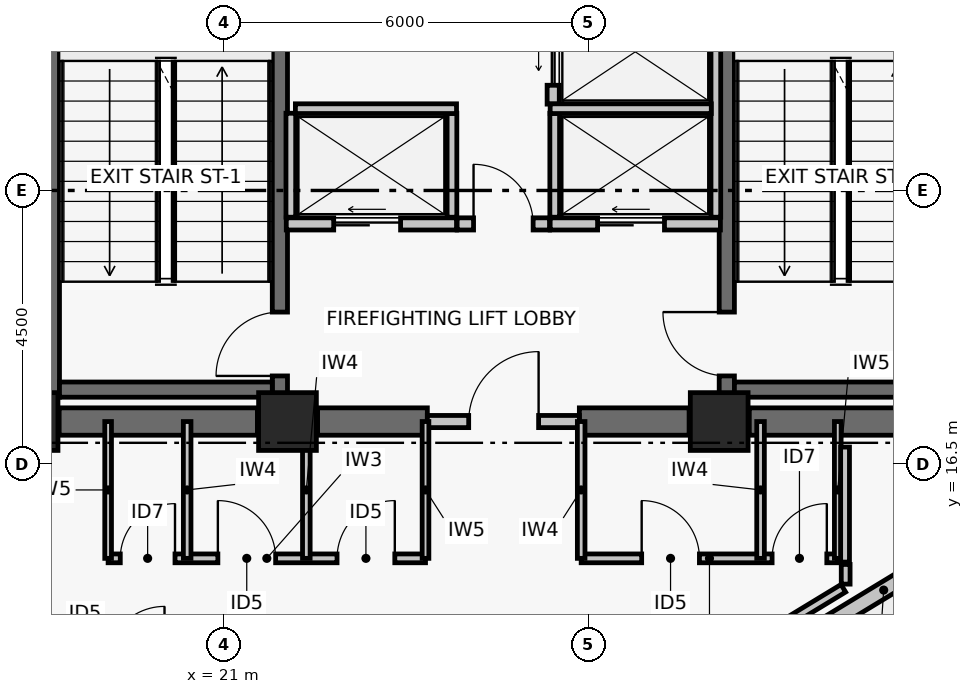
"""IFC4 building model, lengths in metres.
Left out: names, types, materials, properties, quantities, classifications, styles, units other than length and angle.
Written with IfcOpenShell. Run it as: python <this file> out.ifc"""

import sys

from ifc_helpers import new_model, si_unit, direction, frame, frame_2d, origin, origin_2d, place, context, subcontext, project, spatial, rectangle, extrude, element, fill, save


model = new_model("IFC4")
c1 = context("Model", 3, precision=1e-05, world=origin(), true_north=direction((0.0, 1.0)))
c2 = subcontext(c1, "Body", "Model", "MODEL_VIEW")
j1 = project(units=[si_unit("LENGTHUNIT", "METRE"), si_unit("PLANEANGLEUNIT", "RADIAN")], contexts=[c1])
p1 = place(None, origin())
s1 = spatial("IfcSite", under=j1, at=p1, CompositionType="ELEMENT")
p2 = place(p1, origin())
s2 = spatial("IfcBuilding", under=s1, at=p2, CompositionType="ELEMENT")
p3 = place(p2, frame((0.0, 0.0, 247.14)))
s3 = spatial("IfcBuildingStorey", under=s2, at=p3, CompositionType="ELEMENT", Elevation=247.14)
for number, where, z_axis, x_axis in (
    (1, (17.8, 17.2, 0.0), (0.0, 0.0, 1.0), (1.0, 0.0, 0.0)),
    (2, (22.05, 17.2, 0.0), (0.0, 0.0, 1.0), (1.0, 0.0, 0.0)),
    (3, (29.15, 17.2, 0.0), (0.0, 0.0, 1.0), (1.0, 0.0, 0.0)),
):
    element("IfcColumn", number, at=place(p3, frame(where, z_axis=z_axis, x_axis=x_axis)), inside=s3, PredefinedType="COLUMN", context=c2, shape_type="SweptSolid", body=[
        extrude(rectangle(XDim=0.95, YDim=0.95, at=origin_2d()), origin(), (0.0, 0.0, 1.0), 3.72),
    ])
p4 = place(p3, frame((18.295, 17.2, 0.0), z_axis=(0.0, 0.0, 1.0), x_axis=(1.0, 0.0, 0.0)))
e4 = element("IfcWall", 4, at=p4, inside=s3, PredefinedType="SHEAR", context=c2, shape_type="SweptSolid", body=[
    extrude(rectangle(XDim=3.26, YDim=0.45, at=frame_2d((1.63, 0.0))), origin(), (0.0, 0.0, 1.0), 3.5),
])
p5 = place(p3, frame((22.545, 17.2, 0.0), z_axis=(0.0, 0.0, 1.0), x_axis=(1.0, 0.0, 0.0)))
e5 = element("IfcWall", 5, at=p5, inside=s3, PredefinedType="SHEAR", context=c2, shape_type="SweptSolid", body=[
    extrude(rectangle(XDim=1.805, YDim=0.45, at=frame_2d((0.903, 0.0))), origin(), (0.0, 0.0, 1.0), 3.5),
])
p6 = place(p3, frame((26.85, 17.2, 0.0), z_axis=(0.0, 0.0, 1.0), x_axis=(1.0, 0.0, 0.0)))
e6 = element("IfcWall", 6, at=p6, inside=s3, PredefinedType="SHEAR", context=c2, shape_type="SweptSolid", body=[
    extrude(rectangle(XDim=1.805, YDim=0.45, at=frame_2d((0.902, 0.0))), origin(), (0.0, 0.0, 1.0), 3.5),
])
p7 = place(p3, frame((29.645, 17.2, 0.0), z_axis=(0.0, 0.0, 1.0), x_axis=(1.0, 0.0, 0.0)))
e7 = element("IfcWall", 7, at=p7, inside=s3, PredefinedType="SHEAR", context=c2, shape_type="SweptSolid", body=[
    extrude(rectangle(XDim=3.26, YDim=0.45, at=frame_2d((1.63, 0.0))), origin(), (0.0, 0.0, 1.0), 3.5),
])
p8 = place(p3, frame((18.175, 17.6, 0.0), z_axis=(0.0, 0.0, 1.0), x_axis=(0.0, 1.0, 0.0)))
e8 = element("IfcWall", 8, at=p8, inside=s3, PredefinedType="SHEAR", context=c2, shape_type="SweptSolid", body=[
    extrude(rectangle(XDim=8.8, YDim=0.25, at=frame_2d((4.4, 0.0))), origin(), (0.0, 0.0, 1.0), 3.5),
])
p9 = place(p3, frame((21.925, 17.6, 0.0), z_axis=(0.0, 0.0, 1.0), x_axis=(0.0, 1.0, 0.0)))
e9 = element("IfcWall", 9, at=p9, inside=s3, PredefinedType="SHEAR", context=c2, shape_type="SweptSolid", body=[
    extrude(rectangle(XDim=8.8, YDim=0.25, at=frame_2d((4.4, 0.0))), origin(), (0.0, 0.0, 1.0), 3.5),
])
p10 = place(p9, frame((0.35, 0.0, 0.0)))
e10 = element("IfcOpeningElement", 10, at=p10, cuts=e9, PredefinedType="OPENING", context=c2, shape_type="SweptSolid", body=[
    extrude(rectangle(XDim=1.05, YDim=2.08, at=frame_2d((0.525, 1.04))), frame((0.0, 0.135, 0.0), z_axis=(0.0, -1.0, 0.0), x_axis=(1.0, 0.0, 0.0)), (0.0, 0.0, 1.0), 0.27),
])
p11 = place(p3, frame((18.3, 17.725, 0.0), z_axis=(0.0, 0.0, 1.0), x_axis=(1.0, 0.0, 0.0)))
e11 = element("IfcWall", 11, at=p11, inside=s3, PredefinedType="SHEAR", context=c2, shape_type="SweptSolid", body=[
    extrude(rectangle(XDim=3.5, YDim=0.25, at=frame_2d((1.75, 0.0))), origin(), (0.0, 0.0, 1.0), 3.5),
])
p12 = place(p3, frame((29.275, 17.6, 0.0), z_axis=(0.0, 0.0, 1.0), x_axis=(0.0, 1.0, 0.0)))
e12 = element("IfcWall", 12, at=p12, inside=s3, PredefinedType="SHEAR", context=c2, shape_type="SweptSolid", body=[
    extrude(rectangle(XDim=8.8, YDim=0.25, at=frame_2d((4.4, 0.0))), origin(), (0.0, 0.0, 1.0), 3.5),
])
p13 = place(p12, frame((0.35, 0.0, 0.0)))
e13 = element("IfcOpeningElement", 13, at=p13, cuts=e12, PredefinedType="OPENING", context=c2, shape_type="SweptSolid", body=[
    extrude(rectangle(XDim=1.05, YDim=2.08, at=frame_2d((0.525, 1.04))), frame((0.0, 0.135, 0.0), z_axis=(0.0, -1.0, 0.0), x_axis=(1.0, 0.0, 0.0)), (0.0, 0.0, 1.0), 0.27),
])
p14 = place(p3, frame((29.4, 17.725, 0.0), z_axis=(0.0, 0.0, 1.0), x_axis=(1.0, 0.0, 0.0)))
e14 = element("IfcWall", 14, at=p14, inside=s3, PredefinedType="SHEAR", context=c2, shape_type="SweptSolid", body=[
    extrude(rectangle(XDim=3.5, YDim=0.25, at=frame_2d((1.75, 0.0))), origin(), (0.0, 0.0, 1.0), 3.5),
])
p15 = place(p3, frame((34.474, 16.019, 0.0), z_axis=(0.0, 0.0, 1.0), x_axis=(-0.854667549998, -0.519175672563, 0.0)))
e15 = element("IfcWall", 15, at=p15, inside=s3, PredefinedType="PARTITIONING", context=c2, shape_type="SweptSolid", body=[
    extrude(rectangle(XDim=6.127, YDim=0.26, at=frame_2d((3.063, 0.0))), origin(), (0.0, 0.0, 1.0), 3.5),
])
p16 = place(p3, frame((24.35, 17.2, 0.0), z_axis=(0.0, 0.0, 1.0), x_axis=(1.0, 0.0, 0.0)))
e16 = element("IfcWall", 16, at=p16, inside=s3, PredefinedType="PARTITIONING", context=c2, shape_type="SweptSolid", body=[
    extrude(rectangle(XDim=2.5, YDim=0.2, at=frame_2d((1.25, 0.0))), origin(), (0.0, 0.0, 1.0), 2.63),
])
p17 = place(p16, frame((0.68, 0.0, 0.0)))
e17 = element("IfcOpeningElement", 17, at=p17, cuts=e16, PredefinedType="OPENING", context=c2, shape_type="SweptSolid", body=[
    extrude(rectangle(XDim=1.15, YDim=2.08, at=frame_2d((0.575, 1.04))), frame((0.0, 0.11, 0.0), z_axis=(0.0, -1.0, 0.0), x_axis=(1.0, 0.0, 0.0)), (0.0, 0.0, 1.0), 0.22),
])
p18 = place(p3, frame((24.84, 20.45, 0.0), z_axis=(0.0, 0.0, 1.0), x_axis=(1.0, 0.0, 0.0)))
e18 = element("IfcWall", 18, at=p18, inside=s3, PredefinedType="PARTITIONING", context=c2, shape_type="SweptSolid", body=[
    extrude(rectangle(XDim=1.52, YDim=0.2, at=frame_2d((0.76, 0.0))), origin(), (0.0, 0.0, 1.0), 3.5),
])
p19 = place(p18, frame((0.27, 0.0, 0.0)))
e19 = element("IfcOpeningElement", 19, at=p19, cuts=e18, PredefinedType="OPENING", context=c2, shape_type="SweptSolid", body=[
    extrude(rectangle(XDim=0.98, YDim=2.06, at=frame_2d((0.49, 1.03))), frame((0.0, 0.11, 0.0), z_axis=(0.0, -1.0, 0.0), x_axis=(1.0, 0.0, 0.0)), (0.0, 0.0, 1.0), 0.22),
])
p20 = place(p3, frame((22.03, 20.45, 0.0), z_axis=(0.0, 0.0, 1.0), x_axis=(1.0, 0.0, 0.0)))
e20 = element("IfcWall", 20, at=p20, inside=s3, PredefinedType="PARTITIONING", context=c2, shape_type="SweptSolid", body=[
    extrude(rectangle(XDim=2.8, YDim=0.2, at=frame_2d((1.4, 0.0))), origin(), (0.0, 0.0, 1.0), 3.5),
])
p21 = place(p20, frame((0.78, 0.0, 0.0)))
e21 = element("IfcOpeningElement", 21, at=p21, cuts=e20, PredefinedType="OPENING", context=c2, shape_type="SweptSolid", body=[
    extrude(rectangle(XDim=1.1, YDim=2.08, at=frame_2d((0.55, 1.04))), frame((0.0, 0.11, 0.0), z_axis=(0.0, -1.0, 0.0), x_axis=(1.0, 0.0, 0.0)), (0.0, 0.0, 1.0), 0.22),
])
p22 = place(p3, frame((26.37, 20.45, 0.0), z_axis=(0.0, 0.0, 1.0), x_axis=(1.0, 0.0, 0.0)))
e22 = element("IfcWall", 22, at=p22, inside=s3, PredefinedType="PARTITIONING", context=c2, shape_type="SweptSolid", body=[
    extrude(rectangle(XDim=2.8, YDim=0.2, at=frame_2d((1.4, 0.0))), origin(), (0.0, 0.0, 1.0), 3.5),
])
p23 = place(p22, frame((0.78, 0.0, 0.0)))
e23 = element("IfcOpeningElement", 23, at=p23, cuts=e22, PredefinedType="OPENING", context=c2, shape_type="SweptSolid", body=[
    extrude(rectangle(XDim=1.1, YDim=2.08, at=frame_2d((0.55, 1.04))), frame((0.0, 0.11, 0.0), z_axis=(0.0, -1.0, 0.0), x_axis=(1.0, 0.0, 0.0)), (0.0, 0.0, 1.0), 0.22),
])
p24 = place(p3, frame((26.42, 22.42, 0.0), z_axis=(0.0, 0.0, 1.0), x_axis=(0.0, 1.0, 0.0)))
e24 = element("IfcWall", 24, at=p24, inside=s3, PredefinedType="PARTITIONING", context=c2, shape_type="SweptSolid", body=[
    extrude(rectangle(XDim=1.72, YDim=0.2, at=frame_2d((0.86, 0.0))), origin(), (0.0, 0.0, 1.0), 3.5),
])
p25 = place(p24, frame((0.31, 0.0, 0.0)))
e25 = element("IfcOpeningElement", 25, at=p25, cuts=e24, PredefinedType="OPENING", context=c2, shape_type="SweptSolid", body=[
    extrude(rectangle(XDim=1.1, YDim=2.08, at=frame_2d((0.55, 1.04))), frame((0.0, 0.11, 0.0), z_axis=(0.0, -1.0, 0.0), x_axis=(1.0, 0.0, 0.0)), (0.0, 0.0, 1.0), 0.22),
])
for number, where, z_axis, x_axis in (
    (26, (22.105, 20.56, 0.0), (0.0, 0.0, 1.0), (0.0, 1.0, 0.0)),
    (27, (24.755, 20.56, 0.0), (0.0, 0.0, 1.0), (0.0, 1.0, 0.0)),
):
    element("IfcWall", number, at=place(p3, frame(where, z_axis=z_axis, x_axis=x_axis)), inside=s3, PredefinedType="PARTITIONING", context=c2, shape_type="SweptSolid", body=[
        extrude(rectangle(XDim=1.71, YDim=0.16, at=frame_2d((0.855, 0.0))), origin(), (0.0, 0.0, 1.0), 3.5),
    ])
p26 = place(p3, frame((22.18, 22.345, 0.0), z_axis=(0.0, 0.0, 1.0), x_axis=(1.0, 0.0, 0.0)))
e28 = element("IfcWall", 28, at=p26, inside=s3, PredefinedType="PARTITIONING", context=c2, shape_type="SweptSolid", body=[
    extrude(rectangle(XDim=2.65, YDim=0.16, at=frame_2d((1.325, 0.0))), origin(), (0.0, 0.0, 1.0), 3.5),
])
p27 = place(p3, frame((29.095, 20.56, 0.0), z_axis=(0.0, 0.0, 1.0), x_axis=(0.0, 1.0, 0.0)))
e29 = element("IfcWall", 29, at=p27, inside=s3, PredefinedType="PARTITIONING", context=c2, shape_type="SweptSolid", body=[
    extrude(rectangle(XDim=3.58, YDim=0.16, at=frame_2d((1.79, 0.0))), origin(), (0.0, 0.0, 1.0), 3.5),
])
p28 = place(p3, frame((26.445, 20.56, 0.0), z_axis=(0.0, 0.0, 1.0), x_axis=(0.0, 1.0, 0.0)))
e30 = element("IfcWall", 30, at=p28, inside=s3, PredefinedType="PARTITIONING", context=c2, shape_type="SweptSolid", body=[
    extrude(rectangle(XDim=1.71, YDim=0.16, at=frame_2d((0.855, 0.0))), origin(), (0.0, 0.0, 1.0), 3.5),
])
p29 = place(p3, frame((26.37, 22.345, 0.0), z_axis=(0.0, 0.0, 1.0), x_axis=(1.0, 0.0, 0.0)))
e31 = element("IfcWall", 31, at=p29, inside=s3, PredefinedType="PARTITIONING", context=c2, shape_type="SweptSolid", body=[
    extrude(rectangle(XDim=2.65, YDim=0.16, at=frame_2d((1.325, 0.0))), origin(), (0.0, 0.0, 1.0), 3.5),
])
p30 = place(p3, frame((19.1, 14.95, 0.0), z_axis=(0.0, 0.0, 1.0), x_axis=(1.0, 0.0, 0.0)))
e32 = element("IfcWall", 32, at=p30, inside=s3, PredefinedType="PARTITIONING", context=c2, shape_type="SweptSolid", body=[
    extrude(rectangle(XDim=5.22, YDim=0.145, at=frame_2d((2.61, 0.0))), origin(), (0.0, 0.0, 1.0), 2.78),
])
p31 = place(p30, frame((0.2, 0.0, 0.0)))
e33 = element("IfcOpeningElement", 33, at=p31, cuts=e32, PredefinedType="OPENING", context=c2, shape_type="SweptSolid", body=[
    extrude(rectangle(XDim=0.9, YDim=2.02, at=frame_2d((0.45, 1.01))), frame((0.0, 0.083, 0.0), z_axis=(0.0, -1.0, 0.0), x_axis=(1.0, 0.0, 0.0)), (0.0, 0.0, 1.0), 0.165),
])
p32 = place(p30, frame((1.805, 0.0, 0.0)))
e34 = element("IfcOpeningElement", 34, at=p32, cuts=e32, PredefinedType="OPENING", context=c2, shape_type="SweptSolid", body=[
    extrude(rectangle(XDim=0.95, YDim=2.06, at=frame_2d((0.475, 1.03))), frame((0.0, 0.083, 0.0), z_axis=(0.0, -1.0, 0.0), x_axis=(1.0, 0.0, 0.0)), (0.0, 0.0, 1.0), 0.165),
])
p33 = place(p30, frame((3.765, 0.0, 0.0)))
e35 = element("IfcOpeningElement", 35, at=p33, cuts=e32, PredefinedType="OPENING", context=c2, shape_type="SweptSolid", body=[
    extrude(rectangle(XDim=0.95, YDim=2.06, at=frame_2d((0.475, 1.03))), frame((0.0, 0.083, 0.0), z_axis=(0.0, -1.0, 0.0), x_axis=(1.0, 0.0, 0.0)), (0.0, 0.0, 1.0), 0.165),
])
p34 = place(p3, frame((26.88, 14.95, 0.0), z_axis=(0.0, 0.0, 1.0), x_axis=(1.0, 0.0, 0.0)))
e36 = element("IfcWall", 36, at=p34, inside=s3, PredefinedType="PARTITIONING", context=c2, shape_type="SweptSolid", body=[
    extrude(rectangle(XDim=4.22, YDim=0.145, at=frame_2d((2.11, 0.0))), origin(), (0.0, 0.0, 1.0), 2.98),
])
p35 = place(p34, frame((0.995, 0.0, 0.0)))
e37 = element("IfcOpeningElement", 37, at=p35, cuts=e36, PredefinedType="OPENING", context=c2, shape_type="SweptSolid", body=[
    extrude(rectangle(XDim=0.95, YDim=2.06, at=frame_2d((0.475, 1.03))), frame((0.0, 0.083, 0.0), z_axis=(0.0, -1.0, 0.0), x_axis=(1.0, 0.0, 0.0)), (0.0, 0.0, 1.0), 0.165),
])
p36 = place(p34, frame((3.14, 0.0, 0.0)))
e38 = element("IfcOpeningElement", 38, at=p36, cuts=e36, PredefinedType="OPENING", context=c2, shape_type="SweptSolid", body=[
    extrude(rectangle(XDim=0.9, YDim=2.02, at=frame_2d((0.45, 1.01))), frame((0.0, 0.083, 0.0), z_axis=(0.0, -1.0, 0.0), x_axis=(1.0, 0.0, 0.0)), (0.0, 0.0, 1.0), 0.165),
])
p37 = place(p3, frame((19.1, 14.95, 0.0), z_axis=(0.0, 0.0, 1.0), x_axis=(0.0, 1.0, 0.0)))
e39 = element("IfcWall", 39, at=p37, inside=s3, PredefinedType="PARTITIONING", context=c2, shape_type="SweptSolid", body=[
    extrude(rectangle(XDim=2.25, YDim=0.11, at=frame_2d((1.125, 0.0))), origin(), (0.0, 0.0, 1.0), 2.63),
])
for number, where, z_axis, x_axis in (
    (40, (20.4, 14.95, 0.0), (0.0, 0.0, 1.0), (0.0, 1.0, 0.0)),
    (41, (22.36, 14.95, 0.0), (0.0, 0.0, 1.0), (0.0, 1.0, 0.0)),
):
    element("IfcWall", number, at=place(p3, frame(where, z_axis=z_axis, x_axis=x_axis)), inside=s3, PredefinedType="PARTITIONING", context=c2, shape_type="SweptSolid", body=[
        extrude(rectangle(XDim=2.25, YDim=0.125, at=frame_2d((1.125, 0.0))), origin(), (0.0, 0.0, 1.0), 2.63),
    ])
p38 = place(p3, frame((24.32, 14.95, 0.0), z_axis=(0.0, 0.0, 1.0), x_axis=(0.0, 1.0, 0.0)))
e42 = element("IfcWall", 42, at=p38, inside=s3, PredefinedType="PARTITIONING", context=c2, shape_type="SweptSolid", body=[
    extrude(rectangle(XDim=2.25, YDim=0.11, at=frame_2d((1.125, 0.0))), origin(), (0.0, 0.0, 1.0), 2.63),
])
for number, where, z_axis, x_axis in (
    (43, (26.88, 14.95, 0.0), (0.0, 0.0, 1.0), (0.0, 1.0, 0.0)),
    (44, (29.83, 14.95, 0.0), (0.0, 0.0, 1.0), (0.0, 1.0, 0.0)),
):
    element("IfcWall", number, at=place(p3, frame(where, z_axis=z_axis, x_axis=x_axis)), inside=s3, PredefinedType="PARTITIONING", context=c2, shape_type="SweptSolid", body=[
        extrude(rectangle(XDim=2.25, YDim=0.125, at=frame_2d((1.125, 0.0))), origin(), (0.0, 0.0, 1.0), 2.63),
    ])
p39 = place(p3, frame((31.1, 14.95, 0.0), z_axis=(0.0, 0.0, 1.0), x_axis=(0.0, 1.0, 0.0)))
e45 = element("IfcWall", 45, at=p39, inside=s3, PredefinedType="PARTITIONING", context=c2, shape_type="SweptSolid", body=[
    extrude(rectangle(XDim=2.25, YDim=0.11, at=frame_2d((1.125, 0.0))), origin(), (0.0, 0.0, 1.0), 2.63),
])
p40 = place(p3, frame((29.168, 13.229, 0.0), z_axis=(0.0, 0.0, 1.0), x_axis=(0.854678044033, 0.519158396876, 0.0)))
e46 = element("IfcWall", 46, at=p40, inside=s3, PredefinedType="PARTITIONING", context=c2, shape_type="SweptSolid", body=[
    extrude(rectangle(XDim=2.368, YDim=0.145, at=frame_2d((1.184, 0.0))), origin(), (0.0, 0.0, 1.0), 3.5),
])
p41 = place(p3, frame((31.23, 14.526, 0.0), z_axis=(0.0, 0.0, 1.0), x_axis=(0.0, 1.0, 0.0)))
e47 = element("IfcWall", 47, at=p41, inside=s3, PredefinedType="PARTITIONING", context=c2, shape_type="SweptSolid", body=[
    extrude(rectangle(XDim=0.324, YDim=0.145, at=frame_2d((0.162, 0.0))), origin(), (0.0, 0.0, 1.0), 3.5),
])
p42 = place(p3, frame((31.22, 14.889, 0.0), z_axis=(0.0, 0.0, 1.0), x_axis=(0.0, 1.0, 0.0)))
e48 = element("IfcWall", 48, at=p42, inside=s3, PredefinedType="PARTITIONING", context=c2, shape_type="SweptSolid", body=[
    extrude(rectangle(XDim=1.891, YDim=0.145, at=frame_2d((0.946, 0.0))), origin(), (0.0, 0.0, 1.0), 2.63),
])
p43 = place(p10, origin())
e49 = element("IfcDoor", 49, at=p43, inside=s3, OperationType="SINGLE_SWING_LEFT", PredefinedType="DOOR", context=c2, shape_type="SweptSolid", body=[
    extrude(rectangle(XDim=1.05, YDim=2.08, at=frame_2d((0.525, 1.04))), frame((0.0, 0.025, 0.0), z_axis=(0.0, -1.0, 0.0), x_axis=(1.0, 0.0, 0.0)), (0.0, 0.0, 1.0), 0.05),
])
fill(e10, e49)
p44 = place(p13, origin())
e50 = element("IfcDoor", 50, at=p44, inside=s3, OperationType="SINGLE_SWING_RIGHT", PredefinedType="DOOR", context=c2, shape_type="SweptSolid", body=[
    extrude(rectangle(XDim=1.05, YDim=2.08, at=frame_2d((0.525, 1.04))), frame((0.0, 0.025, 0.0), z_axis=(0.0, -1.0, 0.0), x_axis=(1.0, 0.0, 0.0)), (0.0, 0.0, 1.0), 0.05),
])
fill(e13, e50)
p45 = place(p17, origin())
e51 = element("IfcDoor", 51, at=p45, inside=s3, OperationType="SINGLE_SWING_RIGHT", PredefinedType="DOOR", context=c2, shape_type="SweptSolid", body=[
    extrude(rectangle(XDim=1.15, YDim=2.08, at=frame_2d((0.575, 1.04))), frame((0.0, 0.025, 0.0), z_axis=(0.0, -1.0, 0.0), x_axis=(1.0, 0.0, 0.0)), (0.0, 0.0, 1.0), 0.05),
])
fill(e17, e51)
p46 = place(p19, origin())
e52 = element("IfcDoor", 52, at=p46, inside=s3, OperationType="SINGLE_SWING_LEFT", PredefinedType="DOOR", context=c2, shape_type="SweptSolid", body=[
    extrude(rectangle(XDim=0.98, YDim=2.06, at=frame_2d((0.49, 1.03))), frame((0.0, 0.025, 0.0), z_axis=(0.0, -1.0, 0.0), x_axis=(1.0, 0.0, 0.0)), (0.0, 0.0, 1.0), 0.05),
])
fill(e19, e52)
p47 = place(p21, origin())
e53 = element("IfcDoor", 53, at=p47, inside=s3, OperationType="DOUBLE_DOOR_SLIDING", PredefinedType="DOOR", context=c2, shape_type="SweptSolid", body=[
    extrude(rectangle(XDim=1.1, YDim=2.08, at=frame_2d((0.55, 1.04))), frame((0.0, 0.025, 0.0), z_axis=(0.0, -1.0, 0.0), x_axis=(1.0, 0.0, 0.0)), (0.0, 0.0, 1.0), 0.05),
])
fill(e21, e53)
p48 = place(p23, origin())
e54 = element("IfcDoor", 54, at=p48, inside=s3, OperationType="DOUBLE_DOOR_SLIDING", PredefinedType="DOOR", context=c2, shape_type="SweptSolid", body=[
    extrude(rectangle(XDim=1.1, YDim=2.08, at=frame_2d((0.55, 1.04))), frame((0.0, 0.025, 0.0), z_axis=(0.0, -1.0, 0.0), x_axis=(1.0, 0.0, 0.0)), (0.0, 0.0, 1.0), 0.05),
])
fill(e23, e54)
p49 = place(p25, origin())
e55 = element("IfcDoor", 55, at=p49, inside=s3, OperationType="DOUBLE_DOOR_SLIDING", PredefinedType="DOOR", context=c2, shape_type="SweptSolid", body=[
    extrude(rectangle(XDim=1.1, YDim=2.08, at=frame_2d((0.55, 1.04))), frame((0.0, 0.025, 0.0), z_axis=(0.0, -1.0, 0.0), x_axis=(1.0, 0.0, 0.0)), (0.0, 0.0, 1.0), 0.05),
])
fill(e25, e55)
p50 = place(p31, origin())
e56 = element("IfcDoor", 56, at=p50, inside=s3, OperationType="SINGLE_SWING_RIGHT", PredefinedType="DOOR", context=c2, shape_type="SweptSolid", body=[
    extrude(rectangle(XDim=0.9, YDim=2.02, at=frame_2d((0.45, 1.01))), frame((0.0, 0.025, 0.0), z_axis=(0.0, -1.0, 0.0), x_axis=(1.0, 0.0, 0.0)), (0.0, 0.0, 1.0), 0.05),
])
fill(e33, e56)
p51 = place(p32, origin())
e57 = element("IfcDoor", 57, at=p51, inside=s3, OperationType="SINGLE_SWING_LEFT", PredefinedType="DOOR", context=c2, shape_type="SweptSolid", body=[
    extrude(rectangle(XDim=0.95, YDim=2.06, at=frame_2d((0.475, 1.03))), frame((0.0, 0.025, 0.0), z_axis=(0.0, -1.0, 0.0), x_axis=(1.0, 0.0, 0.0)), (0.0, 0.0, 1.0), 0.05),
])
fill(e34, e57)
p52 = place(p33, origin())
e58 = element("IfcDoor", 58, at=p52, inside=s3, OperationType="SINGLE_SWING_RIGHT", PredefinedType="DOOR", context=c2, shape_type="SweptSolid", body=[
    extrude(rectangle(XDim=0.95, YDim=2.06, at=frame_2d((0.475, 1.03))), frame((0.0, 0.025, 0.0), z_axis=(0.0, -1.0, 0.0), x_axis=(1.0, 0.0, 0.0)), (0.0, 0.0, 1.0), 0.05),
])
fill(e35, e58)
p53 = place(p35, origin())
e59 = element("IfcDoor", 59, at=p53, inside=s3, OperationType="SINGLE_SWING_LEFT", PredefinedType="DOOR", context=c2, shape_type="SweptSolid", body=[
    extrude(rectangle(XDim=0.95, YDim=2.06, at=frame_2d((0.475, 1.03))), frame((0.0, 0.025, 0.0), z_axis=(0.0, -1.0, 0.0), x_axis=(1.0, 0.0, 0.0)), (0.0, 0.0, 1.0), 0.05),
])
fill(e37, e59)
p54 = place(p36, origin())
e60 = element("IfcDoor", 60, at=p54, inside=s3, OperationType="SINGLE_SWING_RIGHT", PredefinedType="DOOR", context=c2, shape_type="SweptSolid", body=[
    extrude(rectangle(XDim=0.9, YDim=2.02, at=frame_2d((0.45, 1.01))), frame((0.0, 0.025, 0.0), z_axis=(0.0, -1.0, 0.0), x_axis=(1.0, 0.0, 0.0)), (0.0, 0.0, 1.0), 0.05),
])
fill(e38, e60)
save(model, sys.argv[1])
